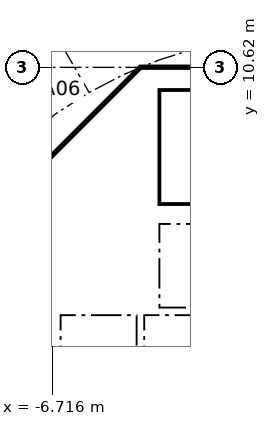
"""IFC4 building model, lengths in metres.
Left out: names, types, materials, properties, quantities, classifications, styles, units other than length and angle.
Written with IfcOpenShell. Run it as: python <this file> out.ifc"""

import sys

from ifc_helpers import new_model, si_unit, direction, frame, frame_2d, origin, place, context, subcontext, project, spatial, polyline, rectangle, outline, extrude, element, fill, save


model = new_model("IFC4")
c1 = context("Model", 3, precision=1e-05, world=origin(), true_north=direction((0.0, 1.0)))
c2 = subcontext(c1, "Body", "Model", "MODEL_VIEW")
j1 = project(units=[si_unit("LENGTHUNIT", "METRE"), si_unit("PLANEANGLEUNIT", "RADIAN")], contexts=[c1])
p1 = place(None, origin())
s1 = spatial("IfcSite", under=j1, at=p1, CompositionType="ELEMENT")
p2 = place(p1, origin())
s2 = spatial("IfcBuilding", under=s1, at=p2, CompositionType="ELEMENT")
p3 = place(p2, frame((0.0, 0.0, 17.0)))
s3 = spatial("IfcBuildingStorey", under=s2, at=p3, CompositionType="ELEMENT", Elevation=17.0)
p4 = place(p3, frame((-4.613, 9.988, 0.0), z_axis=(0.0, 0.0, 1.0), x_axis=(-0.707106781187, -0.707106781187, 0.0)))
e1 = element("IfcWall", 1, at=p4, inside=s3, PredefinedType="SHEAR", context=c2, shape_type="SweptSolid", body=[
    extrude(rectangle(XDim=7.602, YDim=0.6, at=frame_2d((3.801, 0.0))), origin(), (0.0, 0.0, 1.0), 4.7),
])
p5 = place(p4, frame((0.351, 0.0, 0.0)))
e2 = element("IfcOpeningElement", 2, at=p5, cuts=e1, PredefinedType="OPENING", context=c2, shape_type="SweptSolid", body=[
    extrude(rectangle(XDim=1.1, YDim=2.1, at=frame_2d((0.55, 1.05))), frame((0.0, 0.31, 0.0), z_axis=(0.0, -1.0, 0.0), x_axis=(1.0, 0.0, 0.0)), (0.0, 0.0, 1.0), 0.62),
])
p6 = place(p3, frame((-5.8, 4.3, 0.0), z_axis=(0.0, 0.0, 1.0), x_axis=(0.0, 1.0, 0.0)))
e3 = element("IfcWall", 3, at=p6, inside=s3, PredefinedType="PARTITIONING", context=c2, shape_type="SweptSolid", body=[
    extrude(rectangle(XDim=3.927, YDim=0.15, at=frame_2d((1.963, 0.0))), origin(), (0.0, 0.0, 1.0), 4.7),
])
p7 = place(p6, frame((1.551, 0.0, 0.0)))
e4 = element("IfcOpeningElement", 4, at=p7, cuts=e3, PredefinedType="OPENING", context=c2, shape_type="SweptSolid", body=[
    extrude(rectangle(XDim=0.9, YDim=2.1, at=frame_2d((0.45, 1.05))), frame((0.0, 0.085, 0.0), z_axis=(0.0, -1.0, 0.0), x_axis=(1.0, 0.0, 0.0)), (0.0, 0.0, 1.0), 0.17),
])
p8 = place(p3, frame((-4.0, 4.3, 0.0), z_axis=(0.0, 0.0, 1.0), x_axis=(0.0, 1.0, 0.0)))
e5 = element("IfcWall", 5, at=p8, inside=s3, PredefinedType="SOLIDWALL", context=c2, shape_type="SweptSolid", body=[
    extrude(rectangle(XDim=2.2, YDim=0.2, at=frame_2d((1.1, 0.0))), origin(), (0.0, 0.0, 1.0), 4.7),
])
p9 = place(p8, frame((0.55, 0.0, 0.0)))
e6 = element("IfcOpeningElement", 6, at=p9, cuts=e5, PredefinedType="OPENING", context=c2, shape_type="SweptSolid", body=[
    extrude(rectangle(XDim=1.1, YDim=2.1, at=frame_2d((0.55, 1.05))), frame((0.0, 0.11, 0.0), z_axis=(0.0, -1.0, 0.0), x_axis=(1.0, 0.0, 0.0)), (0.0, 0.0, 1.0), 0.22),
])
p10 = place(p3, origin())
e7 = element("IfcWall", 7, at=p10, inside=s3, PredefinedType="SHEAR", context=c2, shape_type="SweptSolid", body=[
    extrude(outline(polyline([(-4.152, 10.025), (-4.401, 9.776), (-4.825, 10.2), (-4.401, 10.625), (4.401, 10.625), (4.825, 10.2), (4.401, 9.776), (4.152, 10.025), (-4.152, 10.025)])), origin(), (0.0, 0.0, 1.0), 4.7),
])
p11 = place(p3, origin())
e8 = element("IfcWall", 8, at=p11, inside=s3, PredefinedType="SOLIDWALL", context=c2, shape_type="SweptSolid", body=[
    extrude(outline(polyline([(-6.5, 2.1), (-6.7, 2.1), (-6.7, 4.3), (6.7, 4.3), (6.7, 2.1), (6.5, 2.1), (6.5, 4.1), (4.5, 4.1), (4.5, 2.1), (4.3, 2.1), (4.3, 4.1), (2.3, 4.1), (2.3, 2.1), (2.1, 2.1), (2.1, 4.1), (0.1, 4.1), (0.1, 2.1), (-0.1, 2.1), (-0.1, 4.1), (-2.1, 4.1), (-2.1, 2.1), (-2.3, 2.1), (-2.3, 4.1), (-4.3, 4.1), (-4.3, 2.1), (-4.5, 2.1), (-4.5, 4.1), (-6.5, 4.1), (-6.5, 2.1)])), origin(), (0.0, 0.0, 1.0), 4.7),
])
p12 = place(p3, frame((-10.025, 4.0, 0.0), z_axis=(0.0, 0.0, 1.0), x_axis=(1.0, 0.0, 0.0)))
e9 = element("IfcWall", 9, at=p12, inside=s3, PredefinedType="PARTITIONING", context=c2, shape_type="SweptSolid", body=[
    extrude(rectangle(XDim=3.325, YDim=0.2, at=frame_2d((1.662, 0.0))), origin(), (0.0, 0.0, 1.0), 4.7),
])
p13 = place(p3, origin())
e10 = element("IfcWall", 10, at=p13, inside=s3, PredefinedType="SOLIDWALL", context=c2, shape_type="SweptSolid", body=[
    extrude(outline(polyline([(-3.9, 7.025), (-4.1, 7.025), (-4.1, 10.025), (-3.9, 10.025), (-3.9, 7.025)])), origin(), (0.0, 0.0, 1.0), 4.7),
])
p14 = place(p3, origin())
e11 = element("IfcWall", 11, at=p14, inside=s3, PredefinedType="SOLIDWALL", context=c2, shape_type="SweptSolid", body=[
    extrude(outline(polyline([(4.1, 6.5), (-4.1, 6.5), (-4.1, 7.025), (4.1, 7.025), (4.1, 6.5)])), origin(), (0.0, 0.0, 1.0), 4.7),
])
p15 = place(p9, origin())
e12 = element("IfcDoor", 12, at=p15, inside=s3, OperationType="DOUBLE_DOOR_SLIDING", PredefinedType="DOOR", context=c2, shape_type="SweptSolid", body=[
    extrude(rectangle(XDim=1.1, YDim=2.1, at=frame_2d((0.55, 1.05))), frame((0.0, 0.025, 0.0), z_axis=(0.0, -1.0, 0.0), x_axis=(1.0, 0.0, 0.0)), (0.0, 0.0, 1.0), 0.05),
])
fill(e6, e12)
p16 = place(p7, origin())
e13 = element("IfcDoor", 13, at=p16, inside=s3, OperationType="SINGLE_SWING_RIGHT", PredefinedType="DOOR", context=c2, shape_type="SweptSolid", body=[
    extrude(rectangle(XDim=0.9, YDim=2.1, at=frame_2d((0.45, 1.05))), frame((0.0, 0.025, 0.0), z_axis=(0.0, -1.0, 0.0), x_axis=(1.0, 0.0, 0.0)), (0.0, 0.0, 1.0), 0.05),
])
fill(e4, e13)
p17 = place(p5, origin())
e14 = element("IfcDoor", 14, at=p17, inside=s3, OperationType="SINGLE_SWING_RIGHT", PredefinedType="DOOR", context=c2, shape_type="SweptSolid", body=[
    extrude(rectangle(XDim=1.1, YDim=2.1, at=frame_2d((0.55, 1.05))), frame((0.0, 0.025, 0.0), z_axis=(0.0, -1.0, 0.0), x_axis=(1.0, 0.0, 0.0)), (0.0, 0.0, 1.0), 0.05),
])
fill(e2, e14)
save(model, sys.argv[1])
